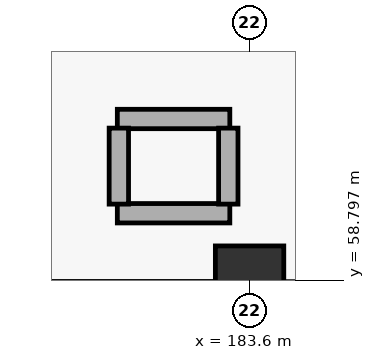
"""IFC4 building model, lengths in metres.
Left out: names, types, materials, properties, quantities, classifications, styles, units other than length and angle.
Written with IfcOpenShell. Run it as: python <this file> out.ifc"""

import sys

from ifc_helpers import new_model, si_unit, direction, frame, frame_2d, origin, origin_2d, place, context, subcontext, project, spatial, rectangle, extrude, element, save


model = new_model("IFC4")
c1 = context("Model", 3, precision=1e-05, world=origin(), true_north=direction((0.0, 1.0)))
c2 = subcontext(c1, "Body", "Model", "MODEL_VIEW")
j1 = project(units=[si_unit("LENGTHUNIT", "METRE"), si_unit("PLANEANGLEUNIT", "RADIAN")], contexts=[c1])
p1 = place(None, origin())
s1 = spatial("IfcSite", under=j1, at=p1, CompositionType="ELEMENT")
p2 = place(p1, origin())
s2 = spatial("IfcBuilding", under=s1, at=p2, CompositionType="ELEMENT")
p3 = place(p2, origin())
s3 = spatial("IfcBuildingStorey", under=s2, at=p3, CompositionType="ELEMENT", Elevation=0.0)
p4 = place(p3, frame((183.6, 58.8, 0.0), z_axis=(0.0, 0.0, 1.0), x_axis=(1.0, 0.0, 0.0)))
e1 = element("IfcColumn", 1, at=p4, inside=s3, PredefinedType="COLUMN", context=c2, shape_type="SweptSolid", body=[
    extrude(rectangle(XDim=0.9, YDim=0.9, at=origin_2d()), origin(), (0.0, 0.0, 1.0), 5.4),
])
for number, where, z_axis, x_axis in (
    (2, (181.86, 60.92, 0.0), (0.0, 0.0, 1.0), (1.0, 0.0, 0.0)),
    (3, (181.86, 59.68, 0.0), (0.0, 0.0, 1.0), (1.0, 0.0, 0.0)),
):
    element("IfcWall", number, at=place(p3, frame(where, z_axis=z_axis, x_axis=x_axis)), inside=s3, PredefinedType="PARTITIONING", context=c2, shape_type="SweptSolid", body=[
        extrude(rectangle(XDim=1.48, YDim=0.255, at=frame_2d((0.74, 0.0))), origin(), (0.0, 0.0, 1.0), 4.29),
    ])
p5 = place(p3, frame((181.88, 59.8, 0.0), z_axis=(0.0, 0.0, 1.0), x_axis=(0.0, 1.0, 0.0)))
e4 = element("IfcWall", 4, at=p5, inside=s3, PredefinedType="PARTITIONING", context=c2, shape_type="SweptSolid", body=[
    extrude(rectangle(XDim=1.0, YDim=0.255, at=frame_2d((0.5, 0.0))), origin(), (0.0, 0.0, 1.0), 5.04),
])
p6 = place(p3, frame((183.32, 59.8, 0.0), z_axis=(0.0, 0.0, 1.0), x_axis=(0.0, 1.0, 0.0)))
e5 = element("IfcWall", 5, at=p6, inside=s3, PredefinedType="PARTITIONING", context=c2, shape_type="SweptSolid", body=[
    extrude(rectangle(XDim=1.0, YDim=0.255, at=frame_2d((0.5, 0.0))), origin(), (0.0, 0.0, 1.0), 4.29),
])
save(model, sys.argv[1])
